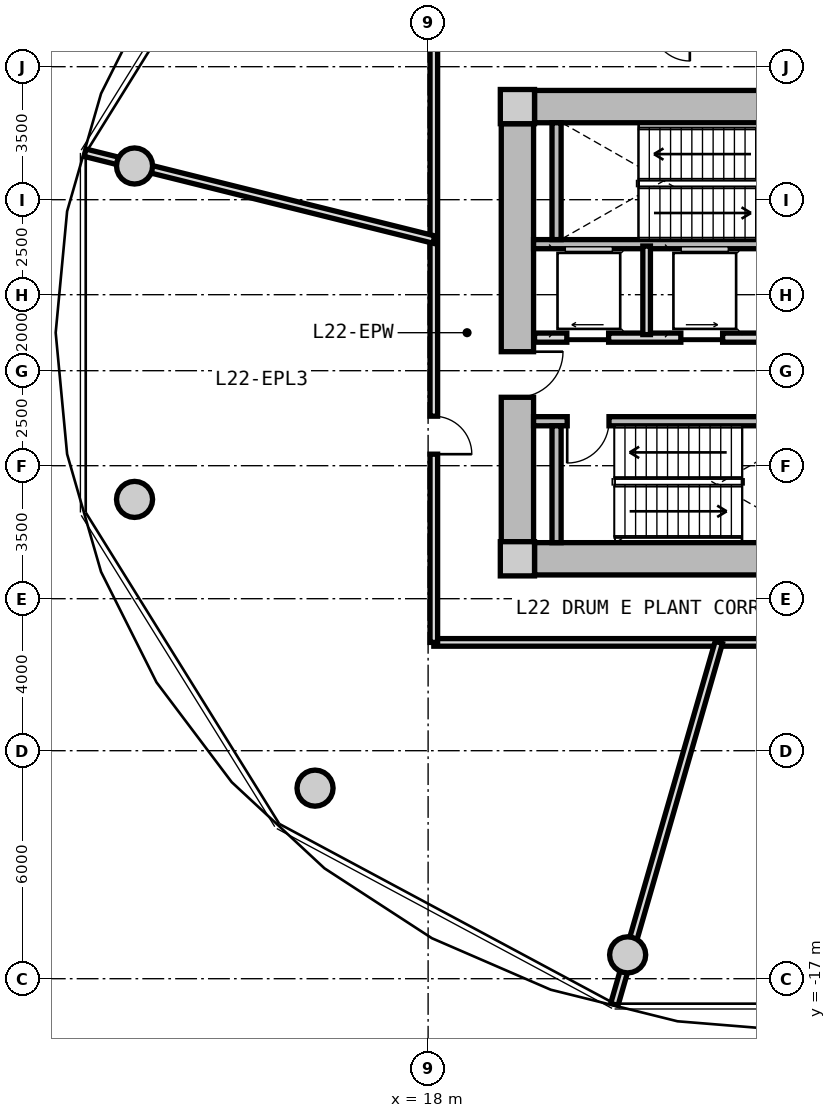
"""IFC4 building model, lengths in metres.
Left out: names, types, materials, properties, quantities, classifications, styles, units other than length and angle.
Written with IfcOpenShell. Run it as: python <this file> out.ifc"""

import sys

from ifc_helpers import new_model, si_unit, direction, frame, frame_2d, origin, origin_2d, place, context, subcontext, project, spatial, rectangle, circle, extrude, source, transform, mapped, element, fill, save


model = new_model("IFC4")
c1 = context("Model", 3, precision=1e-05, world=origin(), true_north=direction((0.0, 1.0)))
c2 = subcontext(c1, "Body", "Model", "MODEL_VIEW")
j1 = project(units=[si_unit("LENGTHUNIT", "METRE"), si_unit("PLANEANGLEUNIT", "RADIAN")], contexts=[c1])
p1 = place(None, origin())
s1 = spatial("IfcSite", under=j1, at=p1, CompositionType="ELEMENT")
p2 = place(p1, origin())
s2 = spatial("IfcBuilding", under=s1, at=p2, CompositionType="ELEMENT")
p3 = place(p2, frame((0.0, 0.0, 73.45)))
s3 = spatial("IfcBuildingStorey", under=s2, at=p3, CompositionType="ELEMENT", Elevation=73.45)
m1 = source(origin(), c2, "Body", "SweptSolid", [
    extrude(rectangle(XDim=0.9, YDim=0.9, at=origin_2d()), origin(), (0.0, 0.0, 1.0), 4.5),
])
for number, where, z_axis, x_axis in (
    (1, (20.35, -5.95, 0.0), (0.0, 0.0, 1.0), (1.0, 0.0, 0.0)),
    (2, (20.35, 5.95, 0.0), (0.0, 0.0, 1.0), (1.0, 0.0, 0.0)),
):
    element("IfcColumn", number, at=place(p3, frame(where, z_axis=z_axis, x_axis=x_axis)), inside=s3, PredefinedType="COLUMN", context=c2, shape_type="MappedRepresentation", body=[
        mapped(m1, transform((0.0, 0.0, 0.0), x_axis=(1.0, 0.0, 0.0), y_axis=(0.0, 1.0, 0.0), z_axis=(0.0, 0.0, 1.0), scale=1.0)),
    ])
m2 = source(origin(), c2, "Body", "SweptSolid", [
    extrude(rectangle(XDim=14.4, YDim=0.85, at=frame_2d((7.2, 0.0))), origin(), (0.0, 0.0, 1.0), 4.08),
])
for number, where, z_axis, x_axis in (
    (3, (20.8, 5.95, 0.0), (0.0, 0.0, 1.0), (1.0, 0.0, 0.0)),
    (4, (35.2, -5.95, 0.0), (0.0, 0.0, 1.0), (-1.0, 0.0, 0.0)),
):
    element("IfcWall", number, at=place(p3, frame(where, z_axis=z_axis, x_axis=x_axis)), inside=s3, PredefinedType="SHEAR", context=c2, shape_type="MappedRepresentation", body=[
        mapped(m2, transform((0.0, 0.0, 0.0), x_axis=(1.0, 0.0, 0.0), y_axis=(0.0, 1.0, 0.0), z_axis=(0.0, 0.0, 1.0), scale=1.0)),
    ])
m3 = source(origin(), c2, "Body", "SweptSolid", [
    extrude(rectangle(XDim=11.0, YDim=0.85, at=frame_2d((5.5, 0.0))), origin(), (0.0, 0.0, 1.0), 4.08),
])
p4 = place(p3, frame((20.35, -5.5, 0.0), z_axis=(0.0, 0.0, 1.0), x_axis=(0.0, 1.0, 0.0)))
e5 = element("IfcWall", 5, at=p4, inside=s3, PredefinedType="SHEAR", context=c2, shape_type="MappedRepresentation", body=[
    mapped(m3, transform((0.0, 0.0, 0.0), x_axis=(1.0, 0.0, 0.0), y_axis=(0.0, 1.0, 0.0), z_axis=(0.0, 0.0, 1.0), scale=1.0)),
])
p5 = place(p4, frame((3.8, 0.0, 0.0)))
e6 = element("IfcOpeningElement", 6, at=p5, cuts=e5, PredefinedType="OPENING", context=c2, shape_type="SweptSolid", body=[
    extrude(rectangle(XDim=1.2, YDim=2.15, at=frame_2d((0.6, 1.075))), frame((0.0, 0.435, 0.0), z_axis=(0.0, -1.0, 0.0), x_axis=(1.0, 0.0, 0.0)), (0.0, 0.0, 1.0), 0.87),
])
m4 = source(origin(), c2, "Body", "SweptSolid", [
    extrude(circle(Radius=0.475, at=origin_2d()), origin(), (0.0, 0.0, 1.0), 4.08),
])
for number, where, z_axis, x_axis in (
    (7, (10.275, 4.387, 0.0), (0.0, 0.0, 1.0), (1.0, 0.0, 0.0)),
    (8, (10.275, -4.387, 0.0), (0.0, 0.0, 1.0), (1.0, 0.0, 0.0)),
    (9, (15.025, -11.985, 0.0), (0.0, 0.0, 1.0), (1.0, 0.0, 0.0)),
    (10, (23.251, -16.373, 0.0), (0.0, 0.0, 1.0), (1.0, 0.0, 0.0)),
):
    element("IfcColumn", number, at=place(p3, frame(where, z_axis=z_axis, x_axis=x_axis)), inside=s3, PredefinedType="COLUMN", context=c2, shape_type="MappedRepresentation", body=[
        mapped(m4, transform((0.0, 0.0, 0.0), x_axis=(1.0, 0.0, 0.0), y_axis=(0.0, 1.0, 0.0), z_axis=(0.0, 0.0, 1.0), scale=1.0)),
    ])
m5 = source(origin(), c2, "Body", "SweptSolid", [
    extrude(rectangle(XDim=7.765, YDim=0.24, at=frame_2d((3.883, 0.0))), origin(), (0.0, 0.0, 1.0), 4.08),
])
p6 = place(p3, frame((20.775, 2.33, 0.0), z_axis=(0.0, 0.0, 1.0), x_axis=(1.0, 0.0, 0.0)))
e11 = element("IfcWall", 11, at=p6, inside=s3, PredefinedType="PARTITIONING", context=c2, shape_type="MappedRepresentation", body=[
    mapped(m5, transform((0.0, 0.0, 0.0), x_axis=(1.0, 0.0, 0.0), y_axis=(0.0, 1.0, 0.0), z_axis=(0.0, 0.0, 1.0), scale=1.0)),
])
m6 = source(origin(), c2, "Body", "SweptSolid", [
    extrude(rectangle(XDim=3.075, YDim=0.24, at=frame_2d((1.538, 0.0))), origin(), (0.0, 0.0, 1.0), 4.08),
])
p7 = place(p3, frame((21.38, 2.45, 0.0), z_axis=(0.0, 0.0, 1.0), x_axis=(0.0, 1.0, 0.0)))
e12 = element("IfcWall", 12, at=p7, inside=s3, PredefinedType="PARTITIONING", context=c2, shape_type="MappedRepresentation", body=[
    mapped(m6, transform((0.0, 0.0, 0.0), x_axis=(1.0, 0.0, 0.0), y_axis=(0.0, 1.0, 0.0), z_axis=(0.0, 0.0, 1.0), scale=1.0)),
])
p8 = place(p3, frame((20.775, -2.33, 0.0), z_axis=(0.0, 0.0, 1.0), x_axis=(1.0, 0.0, 0.0)))
e13 = element("IfcWall", 13, at=p8, inside=s3, PredefinedType="PARTITIONING", context=c2, shape_type="MappedRepresentation", body=[
    mapped(m5, transform((0.0, 0.0, 0.0), x_axis=(1.0, 0.0, 0.0), y_axis=(0.0, 1.0, 0.0), z_axis=(0.0, 0.0, 1.0), scale=1.0)),
])
p9 = place(p8, frame((0.885, 0.0, 0.0)))
e14 = element("IfcOpeningElement", 14, at=p9, cuts=e13, PredefinedType="OPENING", context=c2, shape_type="SweptSolid", body=[
    extrude(rectangle(XDim=1.1, YDim=2.15, at=frame_2d((0.55, 1.075))), frame((0.0, 0.13, 0.0), z_axis=(0.0, -1.0, 0.0), x_axis=(1.0, 0.0, 0.0)), (0.0, 0.0, 1.0), 0.26),
])
p10 = place(p3, frame((21.38, -5.525, 0.0), z_axis=(0.0, 0.0, 1.0), x_axis=(0.0, 1.0, 0.0)))
e15 = element("IfcWall", 15, at=p10, inside=s3, PredefinedType="PARTITIONING", context=c2, shape_type="MappedRepresentation", body=[
    mapped(m6, transform((0.0, 0.0, 0.0), x_axis=(1.0, 0.0, 0.0), y_axis=(0.0, 1.0, 0.0), z_axis=(0.0, 0.0, 1.0), scale=1.0)),
])
m7 = source(origin(), c2, "Body", "SweptSolid", [
    extrude(rectangle(XDim=7.62, YDim=0.24, at=frame_2d((3.81, 0.0))), origin(), (0.0, 0.0, 1.0), 4.065),
])
p11 = place(p3, frame((20.8, -0.13, 0.0), z_axis=(0.0, 0.0, 1.0), x_axis=(1.0, 0.0, 0.0)))
e16 = element("IfcWall", 16, at=p11, inside=s3, PredefinedType="PARTITIONING", context=c2, shape_type="MappedRepresentation", body=[
    mapped(m7, transform((0.0, 0.0, 0.0), x_axis=(1.0, 0.0, 0.0), y_axis=(0.0, 1.0, 0.0), z_axis=(0.0, 0.0, 1.0), scale=1.0)),
])
p12 = place(p11, frame((6.22, 0.0, 0.0)))
e17 = element("IfcOpeningElement", 17, at=p12, cuts=e16, PredefinedType="OPENING", context=c2, shape_type="SweptSolid", body=[
    extrude(rectangle(XDim=1.0, YDim=2.1, at=frame_2d((0.5, 1.05))), frame((0.0, 0.13, 0.0), z_axis=(0.0, -1.0, 0.0), x_axis=(1.0, 0.0, 0.0)), (0.0, 0.0, 1.0), 0.26),
])
p13 = place(p11, frame((0.85, 0.0, 0.0)))
e18 = element("IfcOpeningElement", 18, at=p13, cuts=e16, PredefinedType="OPENING", context=c2, shape_type="SweptSolid", body=[
    extrude(rectangle(XDim=1.1, YDim=2.2, at=frame_2d((0.55, 1.1))), frame((0.0, 0.13, 0.0), z_axis=(0.0, -1.0, 0.0), x_axis=(1.0, 0.0, 0.0)), (0.0, 0.0, 1.0), 0.26),
])
p14 = place(p11, frame((3.85, 0.0, 0.0)))
e19 = element("IfcOpeningElement", 19, at=p14, cuts=e16, PredefinedType="OPENING", context=c2, shape_type="SweptSolid", body=[
    extrude(rectangle(XDim=1.1, YDim=2.2, at=frame_2d((0.55, 1.1))), frame((0.0, 0.13, 0.0), z_axis=(0.0, -1.0, 0.0), x_axis=(1.0, 0.0, 0.0)), (0.0, 0.0, 1.0), 0.26),
])
m8 = source(origin(), c2, "Body", "SweptSolid", [
    extrude(rectangle(XDim=2.33, YDim=0.2, at=frame_2d((1.165, 0.0))), origin(), (0.0, 0.0, 1.0), 4.065),
])
p15 = place(p3, frame((23.75, -0.05, 0.0), z_axis=(0.0, 0.0, 1.0), x_axis=(0.0, 1.0, 0.0)))
e20 = element("IfcWall", 20, at=p15, inside=s3, PredefinedType="PARTITIONING", context=c2, shape_type="MappedRepresentation", body=[
    mapped(m8, transform((0.0, 0.0, 0.0), x_axis=(1.0, 0.0, 0.0), y_axis=(0.0, 1.0, 0.0), z_axis=(0.0, 0.0, 1.0), scale=1.0)),
])
m9 = source(origin(), c2, "Body", "SweptSolid", [
    extrude(rectangle(XDim=19.7, YDim=0.2, at=frame_2d((9.85, 0.0))), origin(), (0.0, 0.0, 1.0), 4.065),
])
p16 = place(p3, frame((37.85, -8.15, 0.0), z_axis=(0.0, 0.0, 1.0), x_axis=(-1.0, 0.0, 0.0)))
e21 = element("IfcWall", 21, at=p16, inside=s3, PredefinedType="PARTITIONING", context=c2, shape_type="MappedRepresentation", body=[
    mapped(m9, transform((0.0, 0.0, 0.0), x_axis=(1.0, 0.0, 0.0), y_axis=(0.0, 1.0, 0.0), z_axis=(0.0, 0.0, 1.0), scale=1.0)),
])
p17 = place(p16, frame((5.612, 0.0, 0.0)))
e22 = element("IfcOpeningElement", 22, at=p17, cuts=e21, PredefinedType="OPENING", context=c2, shape_type="SweptSolid", body=[
    extrude(rectangle(XDim=1.25, YDim=2.2, at=frame_2d((0.625, 1.1))), frame((0.0, 0.11, 0.0), z_axis=(0.0, -1.0, 0.0), x_axis=(1.0, 0.0, 0.0)), (0.0, 0.0, 1.0), 0.22),
])
m10 = source(origin(), c2, "Body", "SweptSolid", [
    extrude(rectangle(XDim=16.3, YDim=0.2, at=frame_2d((8.15, 0.0))), origin(), (0.0, 0.0, 1.0), 4.065),
])
p18 = place(p3, frame((18.15, -8.15, 0.0), z_axis=(0.0, 0.0, 1.0), x_axis=(0.0, 1.0, 0.0)))
e23 = element("IfcWall", 23, at=p18, inside=s3, PredefinedType="PARTITIONING", context=c2, shape_type="MappedRepresentation", body=[
    mapped(m10, transform((0.0, 0.0, 0.0), x_axis=(1.0, 0.0, 0.0), y_axis=(0.0, 1.0, 0.0), z_axis=(0.0, 0.0, 1.0), scale=1.0)),
])
p19 = place(p18, frame((4.953, 0.0, 0.0)))
e24 = element("IfcOpeningElement", 24, at=p19, cuts=e23, PredefinedType="OPENING", context=c2, shape_type="SweptSolid", body=[
    extrude(rectangle(XDim=1.0, YDim=2.1, at=frame_2d((0.5, 1.05))), frame((0.0, 0.11, 0.0), z_axis=(0.0, -1.0, 0.0), x_axis=(1.0, 0.0, 0.0)), (0.0, 0.0, 1.0), 0.22),
])
m11 = source(origin(), c2, "Body", "SweptSolid", [
    extrude(rectangle(XDim=9.915, YDim=0.2, at=frame_2d((4.958, 0.0))), origin(), (0.0, 0.0, 1.0), 4.065),
])
p20 = place(p3, frame((25.649, -8.15, 0.0), z_axis=(0.0, 0.0, 1.0), x_axis=(-0.277136607861, -0.960830526463, 0.0)))
e25 = element("IfcWall", 25, at=p20, inside=s3, PredefinedType="PARTITIONING", context=c2, shape_type="MappedRepresentation", body=[
    mapped(m11, transform((0.0, 0.0, 0.0), x_axis=(1.0, 0.0, 0.0), y_axis=(0.0, 1.0, 0.0), z_axis=(0.0, 0.0, 1.0), scale=1.0)),
])
m12 = source(origin(), c2, "Body", "SweptSolid", [
    extrude(rectangle(XDim=9.459, YDim=0.2, at=frame_2d((4.729, 0.0))), origin(), (0.0, 0.0, 1.0), 2.515),
])
p21 = place(p3, frame((18.15, 2.452, 0.0), z_axis=(0.0, 0.0, 1.0), x_axis=(-0.970390989268, 0.241539495626, 0.0)))
e26 = element("IfcWall", 26, at=p21, inside=s3, PredefinedType="PARTITIONING", context=c2, shape_type="MappedRepresentation", body=[
    mapped(m12, transform((0.0, 0.0, 0.0), x_axis=(1.0, 0.0, 0.0), y_axis=(0.0, 1.0, 0.0), z_axis=(0.0, 0.0, 1.0), scale=1.0)),
])
m13 = source(origin(), c2, "Body", "SweptSolid", [
    extrude(rectangle(XDim=1.1, YDim=2.15, at=frame_2d((0.55, 1.075))), frame((0.0, 0.025, 0.0), z_axis=(0.0, -1.0, 0.0), x_axis=(1.0, 0.0, 0.0)), (0.0, 0.0, 1.0), 0.05),
])
p22 = place(p9, frame((1.1, 0.0, 0.0), z_axis=(0.0, 0.0, 1.0), x_axis=(-1.0, 0.0, 0.0)))
e27 = element("IfcDoor", 27, at=p22, inside=s3, OperationType="SINGLE_SWING_RIGHT", PredefinedType="DOOR", context=c2, shape_type="MappedRepresentation", body=[
    mapped(m13, transform((0.0, 0.0, 0.0), x_axis=(1.0, 0.0, 0.0), y_axis=(0.0, 1.0, 0.0), z_axis=(0.0, 0.0, 1.0), scale=1.0)),
])
fill(e14, e27)
m14 = source(origin(), c2, "Body", "SweptSolid", [
    extrude(rectangle(XDim=1.2, YDim=2.15, at=frame_2d((0.6, 1.075))), frame((0.0, 0.025, 0.0), z_axis=(0.0, -1.0, 0.0), x_axis=(1.0, 0.0, 0.0)), (0.0, 0.0, 1.0), 0.05),
])
p23 = place(p5, frame((1.2, 0.0, 0.0), z_axis=(0.0, 0.0, 1.0), x_axis=(-1.0, 0.0, 0.0)))
e28 = element("IfcDoor", 28, at=p23, inside=s3, OperationType="SINGLE_SWING_LEFT", PredefinedType="DOOR", context=c2, shape_type="MappedRepresentation", body=[
    mapped(m14, transform((0.0, 0.0, 0.0), x_axis=(1.0, 0.0, 0.0), y_axis=(0.0, 1.0, 0.0), z_axis=(0.0, 0.0, 1.0), scale=1.0)),
])
fill(e6, e28)
m15 = source(origin(), c2, "Body", "SweptSolid", [
    extrude(rectangle(XDim=1.1, YDim=2.2, at=frame_2d((0.55, 1.1))), frame((0.0, 0.025, 0.0), z_axis=(0.0, -1.0, 0.0), x_axis=(1.0, 0.0, 0.0)), (0.0, 0.0, 1.0), 0.05),
])
p24 = place(p13, origin())
e29 = element("IfcDoor", 29, at=p24, inside=s3, OperationType="SLIDING_TO_LEFT", PredefinedType="DOOR", context=c2, shape_type="MappedRepresentation", body=[
    mapped(m15, transform((0.0, 0.0, 0.0), x_axis=(1.0, 0.0, 0.0), y_axis=(0.0, 1.0, 0.0), z_axis=(0.0, 0.0, 1.0), scale=1.0)),
])
fill(e18, e29)
p25 = place(p14, origin())
e30 = element("IfcDoor", 30, at=p25, inside=s3, OperationType="SLIDING_TO_RIGHT", PredefinedType="DOOR", context=c2, shape_type="MappedRepresentation", body=[
    mapped(m15, transform((0.0, 0.0, 0.0), x_axis=(1.0, 0.0, 0.0), y_axis=(0.0, 1.0, 0.0), z_axis=(0.0, 0.0, 1.0), scale=1.0)),
])
fill(e19, e30)
m16 = source(origin(), c2, "Body", "SweptSolid", [
    extrude(rectangle(XDim=1.0, YDim=2.1, at=frame_2d((0.5, 1.05))), frame((0.0, 0.025, 0.0), z_axis=(0.0, -1.0, 0.0), x_axis=(1.0, 0.0, 0.0)), (0.0, 0.0, 1.0), 0.05),
])
p26 = place(p19, frame((1.0, 0.0, 0.0), z_axis=(0.0, 0.0, 1.0), x_axis=(-1.0, 0.0, 0.0)))
e31 = element("IfcDoor", 31, at=p26, inside=s3, OperationType="SINGLE_SWING_RIGHT", PredefinedType="DOOR", context=c2, shape_type="MappedRepresentation", body=[
    mapped(m16, transform((0.0, 0.0, 0.0), x_axis=(1.0, 0.0, 0.0), y_axis=(0.0, 1.0, 0.0), z_axis=(0.0, 0.0, 1.0), scale=1.0)),
])
fill(e24, e31)
save(model, sys.argv[1])
